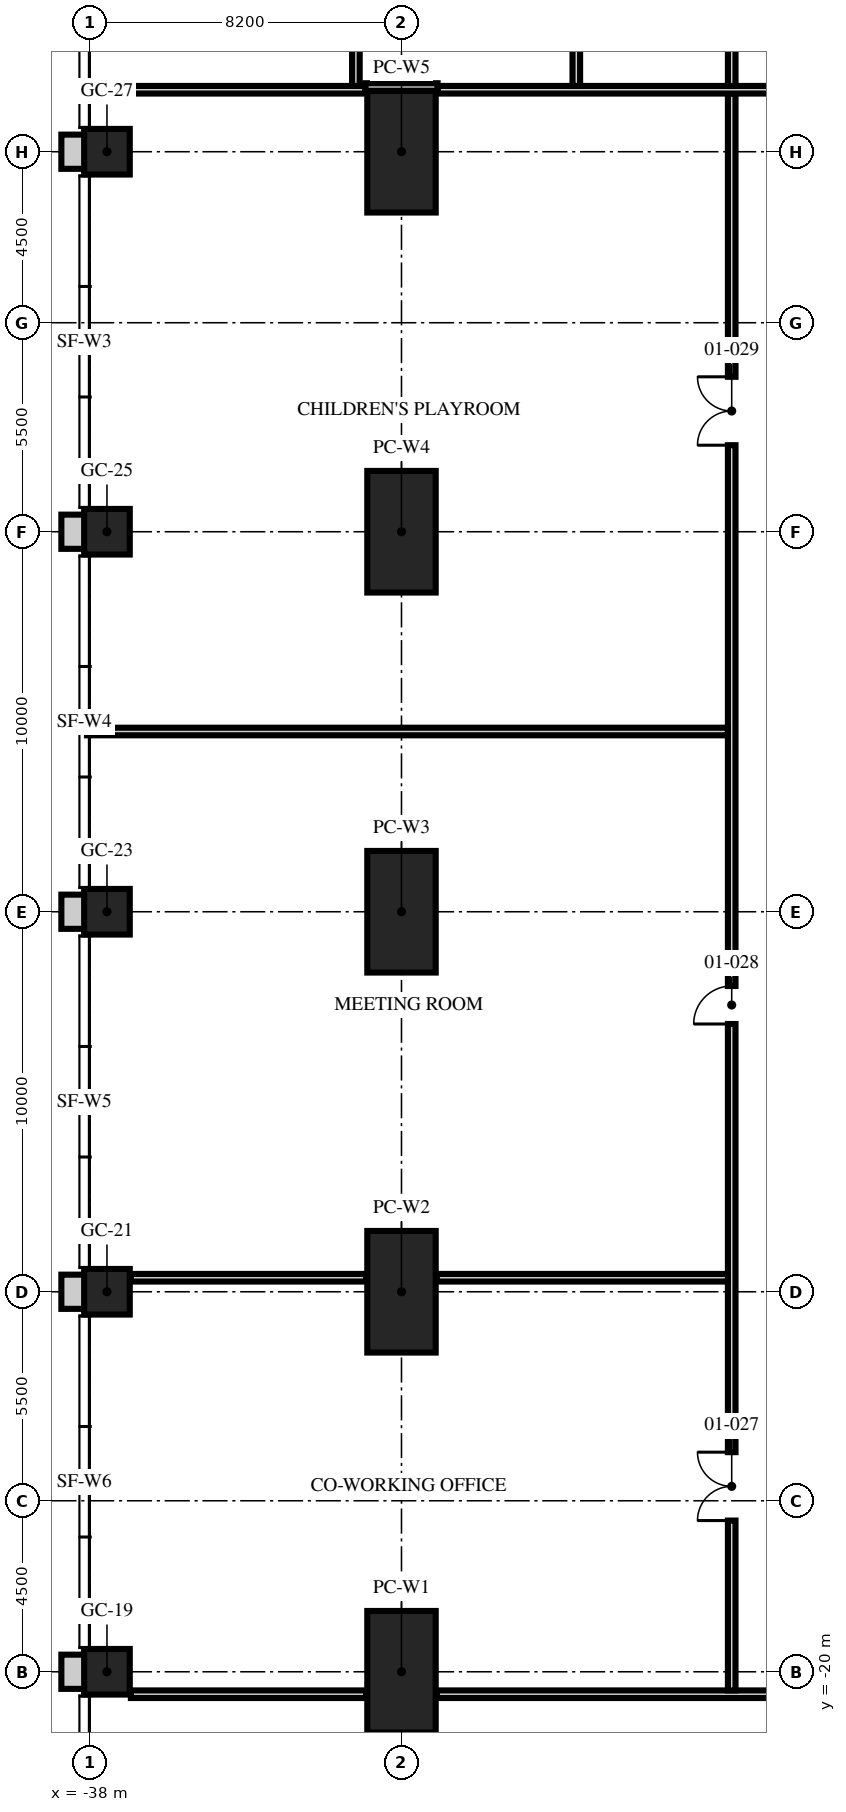
"""IFC4 building model, lengths in metres.
Left out: names, types, materials, properties, quantities, classifications, styles, units other than length and angle.
Written with IfcOpenShell. Run it as: python <this file> out.ifc"""

import sys

from ifc_helpers import new_model, si_unit, direction, frame, frame_2d, origin, origin_2d, place, context, subcontext, project, spatial, rectangle, hollow_rectangle, extrude, element, fill, save


model = new_model("IFC4")
c1 = context("Model", 3, precision=1e-05, world=origin(), true_north=direction((0.0, 1.0)))
c2 = subcontext(c1, "Body", "Model", "MODEL_VIEW")
j1 = project(units=[si_unit("LENGTHUNIT", "METRE"), si_unit("PLANEANGLEUNIT", "RADIAN")], contexts=[c1])
p1 = place(None, origin())
s1 = spatial("IfcSite", under=j1, at=p1, CompositionType="ELEMENT")
p2 = place(p1, origin())
s2 = spatial("IfcBuilding", under=s1, at=p2, CompositionType="ELEMENT")
p3 = place(p2, frame((0.0, 0.0, 6.0)))
s3 = spatial("IfcBuildingStorey", under=s2, at=p3, CompositionType="ELEMENT", Elevation=6.0)
for number, where, z_axis, x_axis in (
    (1, (-29.8, -20.0, 0.0), (0.0, 0.0, 1.0), (0.0, 1.0, 0.0)),
    (2, (-29.8, -10.0, 0.0), (0.0, 0.0, 1.0), (0.0, 1.0, 0.0)),
    (3, (-29.8, 0.0, 0.0), (0.0, 0.0, 1.0), (0.0, 1.0, 0.0)),
    (4, (-29.8, 10.0, 0.0), (0.0, 0.0, 1.0), (0.0, 1.0, 0.0)),
    (5, (-29.8, 20.0, 0.0), (0.0, 0.0, 1.0), (0.0, 1.0, 0.0)),
):
    element("IfcColumn", number, at=place(p3, frame(where, z_axis=z_axis, x_axis=x_axis)), inside=s3, PredefinedType="COLUMN", context=c2, shape_type="SweptSolid", body=[
        extrude(hollow_rectangle(XDim=3.2, YDim=1.8, WallThickness=0.2, at=origin_2d()), origin(), (0.0, 0.0, 1.0), 5.0),
    ])
for number, where, z_axis, x_axis in (
    (6, (-37.55, -20.0, 0.0), (0.0, 0.0, 1.0), (1.0, 0.0, 0.0)),
    (7, (-37.55, -10.0, 0.0), (0.0, 0.0, 1.0), (1.0, 0.0, 0.0)),
    (8, (-37.55, 0.0, 0.0), (0.0, 0.0, 1.0), (1.0, 0.0, 0.0)),
    (9, (-37.55, 10.0, 0.0), (0.0, 0.0, 1.0), (1.0, 0.0, 0.0)),
    (10, (-37.55, 20.0, 0.0), (0.0, 0.0, 1.0), (1.0, 0.0, 0.0)),
):
    element("IfcColumn", number, at=place(p3, frame(where, z_axis=z_axis, x_axis=x_axis)), inside=s3, PredefinedType="COLUMN", context=c2, shape_type="SweptSolid", body=[
        extrude(rectangle(XDim=1.2, YDim=1.2, at=origin_2d()), origin(), (0.0, 0.0, 1.0), 5.0),
    ])
for number, where, z_axis, x_axis in (
    (11, (-38.375, 20.45, 0.0), (0.0, 0.0, 1.0), (0.0, -1.0, 0.0)),
    (12, (-38.375, 10.45, 0.0), (0.0, 0.0, 1.0), (0.0, -1.0, 0.0)),
    (13, (-38.375, 0.45, 0.0), (0.0, 0.0, 1.0), (0.0, -1.0, 0.0)),
    (14, (-38.375, -9.55, 0.0), (0.0, 0.0, 1.0), (0.0, -1.0, 0.0)),
    (15, (-38.375, -19.55, 0.0), (0.0, 0.0, 1.0), (0.0, -1.0, 0.0)),
):
    element("IfcWall", number, at=place(p3, frame(where, z_axis=z_axis, x_axis=x_axis)), inside=s3, PredefinedType="SOLIDWALL", context=c2, shape_type="SweptSolid", body=[
        extrude(rectangle(XDim=0.9, YDim=0.75, at=frame_2d((0.45, 0.0))), origin(), (0.0, 0.0, 1.0), 5.0),
    ])
p4 = place(p3, frame((-36.92, -20.591, 0.0), z_axis=(0.0, 0.0, 1.0), x_axis=(1.0, 0.0, 0.0)))
e16 = element("IfcWall", 16, at=p4, inside=s3, PredefinedType="SOLIDWALL", context=c2, shape_type="SweptSolid", body=[
    extrude(rectangle(XDim=6.19, YDim=0.2, at=frame_2d((3.095, 0.0))), origin(), (0.0, 0.0, 1.0), 3.7),
])
p5 = place(p3, frame((-28.87, -20.591, 0.0), z_axis=(0.0, 0.0, 1.0), x_axis=(1.0, 0.0, 0.0)))
e17 = element("IfcWall", 17, at=p5, inside=s3, PredefinedType="SOLIDWALL", context=c2, shape_type="SweptSolid", body=[
    extrude(rectangle(XDim=57.74, YDim=0.2, at=frame_2d((28.87, 0.0))), origin(), (0.0, 0.0, 1.0), 3.5),
])
p6 = place(p5, frame((11.071, 0.0, 0.0)))
e18 = element("IfcOpeningElement", 18, at=p6, cuts=e17, PredefinedType="OPENING", context=c2, shape_type="SweptSolid", body=[
    extrude(rectangle(XDim=1.8, YDim=2.4, at=frame_2d((0.9, 1.2))), frame((0.0, 0.11, 0.0), z_axis=(0.0, -1.0, 0.0), x_axis=(1.0, 0.0, 0.0)), (0.0, 0.0, 1.0), 0.22),
])
p7 = place(p5, frame((22.351, 0.0, 0.0)))
e19 = element("IfcOpeningElement", 19, at=p7, cuts=e17, PredefinedType="OPENING", context=c2, shape_type="SweptSolid", body=[
    extrude(rectangle(XDim=1.8, YDim=2.4, at=frame_2d((0.9, 1.2))), frame((0.0, 0.11, 0.0), z_axis=(0.0, -1.0, 0.0), x_axis=(1.0, 0.0, 0.0)), (0.0, 0.0, 1.0), 0.22),
])
p8 = place(p5, frame((37.897, 0.0, 0.0)))
e20 = element("IfcOpeningElement", 20, at=p8, cuts=e17, PredefinedType="OPENING", context=c2, shape_type="SweptSolid", body=[
    extrude(rectangle(XDim=1.8, YDim=2.4, at=frame_2d((0.9, 1.2))), frame((0.0, 0.11, 0.0), z_axis=(0.0, -1.0, 0.0), x_axis=(1.0, 0.0, 0.0)), (0.0, 0.0, 1.0), 0.22),
])
p9 = place(p5, frame((16.646, 0.0, 0.0)))
e21 = element("IfcOpeningElement", 21, at=p9, cuts=e17, PredefinedType="OPENING", context=c2, shape_type="SweptSolid", body=[
    extrude(rectangle(XDim=1.8, YDim=2.4, at=frame_2d((0.9, 1.2))), frame((0.0, 0.11, 0.0), z_axis=(0.0, -1.0, 0.0), x_axis=(1.0, 0.0, 0.0)), (0.0, 0.0, 1.0), 0.22),
])
p10 = place(p3, frame((-21.111, -20.491, 0.0), z_axis=(0.0, 0.0, 1.0), x_axis=(0.0, 1.0, 0.0)))
e22 = element("IfcWall", 22, at=p10, inside=s3, PredefinedType="SOLIDWALL", context=c2, shape_type="SweptSolid", body=[
    extrude(rectangle(XDim=42.022, YDim=0.2, at=frame_2d((21.011, 0.0))), origin(), (0.0, 0.0, 1.0), 3.5),
])
p11 = place(p10, frame((4.47, 0.0, 0.0)))
e23 = element("IfcOpeningElement", 23, at=p11, cuts=e22, PredefinedType="OPENING", context=c2, shape_type="SweptSolid", body=[
    extrude(rectangle(XDim=1.8, YDim=2.4, at=frame_2d((0.9, 1.2))), frame((0.0, 0.11, 0.0), z_axis=(0.0, -1.0, 0.0), x_axis=(1.0, 0.0, 0.0)), (0.0, 0.0, 1.0), 0.22),
])
p12 = place(p10, frame((17.537, 0.0, 0.0)))
e24 = element("IfcOpeningElement", 24, at=p12, cuts=e22, PredefinedType="OPENING", context=c2, shape_type="SweptSolid", body=[
    extrude(rectangle(XDim=1.0, YDim=2.1, at=frame_2d((0.5, 1.05))), frame((0.0, 0.11, 0.0), z_axis=(0.0, -1.0, 0.0), x_axis=(1.0, 0.0, 0.0)), (0.0, 0.0, 1.0), 0.22),
])
p13 = place(p10, frame((32.768, 0.0, 0.0)))
e25 = element("IfcOpeningElement", 25, at=p13, cuts=e22, PredefinedType="OPENING", context=c2, shape_type="SweptSolid", body=[
    extrude(rectangle(XDim=1.8, YDim=2.4, at=frame_2d((0.9, 1.2))), frame((0.0, 0.11, 0.0), z_axis=(0.0, -1.0, 0.0), x_axis=(1.0, 0.0, 0.0)), (0.0, 0.0, 1.0), 0.22),
])
p14 = place(p3, frame((-36.92, -9.631, 0.0), z_axis=(0.0, 0.0, 1.0), x_axis=(1.0, 0.0, 0.0)))
e26 = element("IfcWall", 26, at=p14, inside=s3, PredefinedType="SOLIDWALL", context=c2, shape_type="SweptSolid", body=[
    extrude(rectangle(XDim=6.19, YDim=0.2, at=frame_2d((3.095, 0.0))), origin(), (0.0, 0.0, 1.0), 3.7),
])
p15 = place(p3, frame((-28.87, -9.631, 0.0), z_axis=(0.0, 0.0, 1.0), x_axis=(1.0, 0.0, 0.0)))
e27 = element("IfcWall", 27, at=p15, inside=s3, PredefinedType="SOLIDWALL", context=c2, shape_type="SweptSolid", body=[
    extrude(rectangle(XDim=7.659, YDim=0.2, at=frame_2d((3.83, 0.0))), origin(), (0.0, 0.0, 1.0), 4.7),
])
p16 = place(p3, frame((-38.075, 4.743, 0.0), z_axis=(0.0, 0.0, 1.0), x_axis=(1.0, 0.0, 0.0)))
e28 = element("IfcWall", 28, at=p16, inside=s3, PredefinedType="SOLIDWALL", context=c2, shape_type="SweptSolid", body=[
    extrude(rectangle(XDim=16.864, YDim=0.2, at=frame_2d((8.432, 0.0))), origin(), (0.0, 0.0, 1.0), 3.7),
])
p17 = place(p3, frame((-38.075, 21.631, 0.0), z_axis=(0.0, 0.0, 1.0), x_axis=(1.0, 0.0, 0.0)))
e29 = element("IfcWall", 29, at=p17, inside=s3, PredefinedType="SOLIDWALL", context=c2, shape_type="SweptSolid", body=[
    extrude(rectangle(XDim=7.325, YDim=0.2, at=frame_2d((3.663, 0.0))), origin(), (0.0, 0.0, 1.0), 3.7),
])
p18 = place(p3, frame((-28.85, 21.631, 0.0), z_axis=(0.0, 0.0, 1.0), x_axis=(1.0, 0.0, 0.0)))
e30 = element("IfcWall", 30, at=p18, inside=s3, PredefinedType="SOLIDWALL", context=c2, shape_type="SweptSolid", body=[
    extrude(rectangle(XDim=26.95, YDim=0.2, at=frame_2d((13.475, 0.0))), origin(), (0.0, 0.0, 1.0), 3.5),
])
p19 = place(p18, frame((13.804, 0.0, 0.0)))
e31 = element("IfcOpeningElement", 31, at=p19, cuts=e30, PredefinedType="OPENING", context=c2, shape_type="SweptSolid", body=[
    extrude(rectangle(XDim=1.0, YDim=2.1, at=frame_2d((0.5, 1.05))), frame((0.0, 0.11, 0.0), z_axis=(0.0, -1.0, 0.0), x_axis=(1.0, 0.0, 0.0)), (0.0, 0.0, 1.0), 0.22),
])
p20 = place(p3, frame((-30.75, 21.702, 0.0), z_axis=(0.0, 0.0, 1.0), x_axis=(1.0, 0.0, 0.0)))
e32 = element("IfcWall", 32, at=p20, inside=s3, PredefinedType="SOLIDWALL", context=c2, shape_type="SweptSolid", body=[
    extrude(rectangle(XDim=1.9, YDim=0.2, at=frame_2d((0.95, 0.0))), origin(), (0.0, 0.0, 1.0), 3.7),
])
p21 = place(p3, frame((-31.0, 21.731, 0.0), z_axis=(0.0, 0.0, 1.0), x_axis=(0.0, 1.0, 0.0)))
e33 = element("IfcWall", 33, at=p21, inside=s3, PredefinedType="SOLIDWALL", context=c2, shape_type="SweptSolid", body=[
    extrude(rectangle(XDim=5.28, YDim=0.2, at=frame_2d((2.64, 0.0))), origin(), (0.0, 0.0, 1.0), 4.7),
])
p22 = place(p3, frame((-25.2, 21.731, 0.0), z_axis=(0.0, 0.0, 1.0), x_axis=(0.0, 1.0, 0.0)))
e34 = element("IfcWall", 34, at=p22, inside=s3, PredefinedType="SOLIDWALL", context=c2, shape_type="SweptSolid", body=[
    extrude(rectangle(XDim=5.28, YDim=0.2, at=frame_2d((2.64, 0.0))), origin(), (0.0, 0.0, 1.0), 3.5),
])
p23 = place(p3, frame((-21.111, 21.731, 0.0), z_axis=(0.0, 0.0, 1.0), x_axis=(0.0, 1.0, 0.0)))
e35 = element("IfcWall", 35, at=p23, inside=s3, PredefinedType="SOLIDWALL", context=c2, shape_type="SweptSolid", body=[
    extrude(rectangle(XDim=5.28, YDim=0.2, at=frame_2d((2.64, 0.0))), origin(), (0.0, 0.0, 1.0), 4.7),
])
p24 = place(p11, origin())
e36 = element("IfcDoor", 36, at=p24, inside=s3, OperationType="DOUBLE_DOOR_SINGLE_SWING", PredefinedType="DOOR", context=c2, shape_type="SweptSolid", body=[
    extrude(rectangle(XDim=1.8, YDim=2.4, at=frame_2d((0.9, 1.2))), frame((0.0, 0.025, 0.0), z_axis=(0.0, -1.0, 0.0), x_axis=(1.0, 0.0, 0.0)), (0.0, 0.0, 1.0), 0.05),
])
fill(e23, e36)
p25 = place(p12, origin())
e37 = element("IfcDoor", 37, at=p25, inside=s3, OperationType="SINGLE_SWING_LEFT", PredefinedType="DOOR", context=c2, shape_type="SweptSolid", body=[
    extrude(rectangle(XDim=1.0, YDim=2.1, at=frame_2d((0.5, 1.05))), frame((0.0, 0.025, 0.0), z_axis=(0.0, -1.0, 0.0), x_axis=(1.0, 0.0, 0.0)), (0.0, 0.0, 1.0), 0.05),
])
fill(e24, e37)
p26 = place(p13, origin())
e38 = element("IfcDoor", 38, at=p26, inside=s3, OperationType="DOUBLE_DOOR_SINGLE_SWING", PredefinedType="DOOR", context=c2, shape_type="SweptSolid", body=[
    extrude(rectangle(XDim=1.8, YDim=2.4, at=frame_2d((0.9, 1.2))), frame((0.0, 0.025, 0.0), z_axis=(0.0, -1.0, 0.0), x_axis=(1.0, 0.0, 0.0)), (0.0, 0.0, 1.0), 0.05),
])
fill(e25, e38)
save(model, sys.argv[1])
